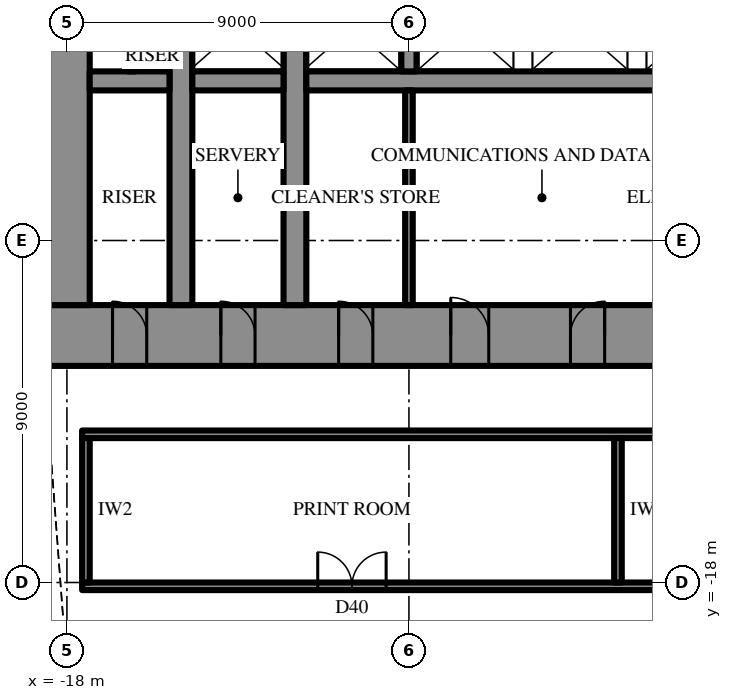
"""IFC4 building model, lengths in metres.
Left out: names, types, materials, properties, quantities, classifications, styles, units other than length and angle.
Written with IfcOpenShell. Run it as: python <this file> out.ifc"""

import sys

from ifc_helpers import new_model, si_unit, direction, frame, frame_2d, origin, place, context, subcontext, project, spatial, rectangle, extrude, element, fill, save


model = new_model("IFC4")
c1 = context("Model", 3, precision=1e-05, world=origin(), true_north=direction((0.0, 1.0)))
c2 = subcontext(c1, "Body", "Model", "MODEL_VIEW")
j1 = project(units=[si_unit("LENGTHUNIT", "METRE"), si_unit("PLANEANGLEUNIT", "RADIAN")], contexts=[c1])
p1 = place(None, origin())
s1 = spatial("IfcSite", under=j1, at=p1, CompositionType="ELEMENT")
p2 = place(p1, origin())
s2 = spatial("IfcBuilding", under=s1, at=p2, CompositionType="ELEMENT")
p3 = place(p2, frame((0.0, 0.0, 157.3)))
s3 = spatial("IfcBuildingStorey", under=s2, at=p3, CompositionType="ELEMENT", Elevation=157.3)
p4 = place(p3, frame((18.6, -11.5, 0.0), z_axis=(0.0, 0.0, 1.0), x_axis=(-1.0, 0.0, 0.0)))
e1 = element("IfcWall", 1, at=p4, inside=s3, PredefinedType="SHEAR", context=c2, shape_type="SweptSolid", body=[
    extrude(rectangle(XDim=37.2, YDim=1.6, at=frame_2d((18.6, 0.0))), origin(), (0.0, 0.0, 1.0), 4.2),
])
p5 = place(p4, frame((19.45, 0.0, 0.0)))
e2 = element("IfcOpeningElement", 2, at=p5, cuts=e1, PredefinedType="OPENING", context=c2, shape_type="SweptSolid", body=[
    extrude(rectangle(XDim=0.9, YDim=2.2, at=frame_2d((0.45, 1.1))), frame((0.0, 0.81, 0.0), z_axis=(0.0, -1.0, 0.0), x_axis=(1.0, 0.0, 0.0)), (0.0, 0.0, 1.0), 1.62),
])
p6 = place(p4, frame((22.45, 0.0, 0.0)))
e3 = element("IfcOpeningElement", 3, at=p6, cuts=e1, PredefinedType="OPENING", context=c2, shape_type="SweptSolid", body=[
    extrude(rectangle(XDim=0.9, YDim=2.2, at=frame_2d((0.45, 1.1))), frame((0.0, 0.81, 0.0), z_axis=(0.0, -1.0, 0.0), x_axis=(1.0, 0.0, 0.0)), (0.0, 0.0, 1.0), 1.62),
])
p7 = place(p4, frame((25.5, 0.0, 0.0)))
e4 = element("IfcOpeningElement", 4, at=p7, cuts=e1, PredefinedType="OPENING", context=c2, shape_type="SweptSolid", body=[
    extrude(rectangle(XDim=1.0, YDim=2.2, at=frame_2d((0.5, 1.1))), frame((0.0, 0.81, 0.0), z_axis=(0.0, -1.0, 0.0), x_axis=(1.0, 0.0, 0.0)), (0.0, 0.0, 1.0), 1.62),
])
p8 = place(p4, frame((1.8, 0.0, 0.0)))
e5 = element("IfcOpeningElement", 5, at=p8, cuts=e1, PredefinedType="OPENING", context=c2, shape_type="SweptSolid", body=[
    extrude(rectangle(XDim=0.9, YDim=2.2, at=frame_2d((0.45, 1.1))), frame((0.0, 0.81, 0.0), z_axis=(0.0, -1.0, 0.0), x_axis=(1.0, 0.0, 0.0)), (0.0, 0.0, 1.0), 1.62),
])
p9 = place(p4, frame((4.65, 0.0, 0.0)))
e6 = element("IfcOpeningElement", 6, at=p9, cuts=e1, PredefinedType="OPENING", context=c2, shape_type="SweptSolid", body=[
    extrude(rectangle(XDim=0.9, YDim=2.2, at=frame_2d((0.45, 1.1))), frame((0.0, 0.81, 0.0), z_axis=(0.0, -1.0, 0.0), x_axis=(1.0, 0.0, 0.0)), (0.0, 0.0, 1.0), 1.62),
])
p10 = place(p4, frame((7.75, 0.0, 0.0)))
e7 = element("IfcOpeningElement", 7, at=p10, cuts=e1, PredefinedType="OPENING", context=c2, shape_type="SweptSolid", body=[
    extrude(rectangle(XDim=0.9, YDim=2.2, at=frame_2d((0.45, 1.1))), frame((0.0, 0.81, 0.0), z_axis=(0.0, -1.0, 0.0), x_axis=(1.0, 0.0, 0.0)), (0.0, 0.0, 1.0), 1.62),
])
p11 = place(p4, frame((28.55, 0.0, 0.0)))
e8 = element("IfcOpeningElement", 8, at=p11, cuts=e1, PredefinedType="OPENING", context=c2, shape_type="SweptSolid", body=[
    extrude(rectangle(XDim=0.9, YDim=2.2, at=frame_2d((0.45, 1.1))), frame((0.0, 0.81, 0.0), z_axis=(0.0, -1.0, 0.0), x_axis=(1.0, 0.0, 0.0)), (0.0, 0.0, 1.0), 1.62),
])
p12 = place(p4, frame((31.65, 0.0, 0.0)))
e9 = element("IfcOpeningElement", 9, at=p12, cuts=e1, PredefinedType="OPENING", context=c2, shape_type="SweptSolid", body=[
    extrude(rectangle(XDim=0.9, YDim=2.2, at=frame_2d((0.45, 1.1))), frame((0.0, 0.81, 0.0), z_axis=(0.0, -1.0, 0.0), x_axis=(1.0, 0.0, 0.0)), (0.0, 0.0, 1.0), 1.62),
])
p13 = place(p4, frame((34.5, 0.0, 0.0)))
e10 = element("IfcOpeningElement", 10, at=p13, cuts=e1, PredefinedType="OPENING", context=c2, shape_type="SweptSolid", body=[
    extrude(rectangle(XDim=0.9, YDim=2.2, at=frame_2d((0.45, 1.1))), frame((0.0, 0.81, 0.0), z_axis=(0.0, -1.0, 0.0), x_axis=(1.0, 0.0, 0.0)), (0.0, 0.0, 1.0), 1.62),
])
p14 = place(p3, frame((-18.0, 10.7, 0.0), z_axis=(0.0, 0.0, 1.0), x_axis=(0.0, -1.0, 0.0)))
e11 = element("IfcWall", 11, at=p14, inside=s3, PredefinedType="SHEAR", context=c2, shape_type="SweptSolid", body=[
    extrude(rectangle(XDim=21.4, YDim=1.2, at=frame_2d((10.7, 0.0))), origin(), (0.0, 0.0, 1.0), 4.2),
])
p15 = place(p14, frame((9.8, 0.0, 0.0)))
e12 = element("IfcOpeningElement", 12, at=p15, cuts=e11, PredefinedType="OPENING", context=c2, shape_type="SweptSolid", body=[
    extrude(rectangle(XDim=1.8, YDim=2.4, at=frame_2d((0.9, 1.2))), frame((0.0, 0.61, 0.0), z_axis=(0.0, -1.0, 0.0), x_axis=(1.0, 0.0, 0.0)), (0.0, 0.0, 1.0), 1.22),
])
p16 = place(p3, frame((-12.0, -10.7, 0.0), z_axis=(0.0, 0.0, 1.0), x_axis=(0.0, 1.0, 0.0)))
e13 = element("IfcWall", 13, at=p16, inside=s3, PredefinedType="SHEAR", context=c2, shape_type="SweptSolid", body=[
    extrude(rectangle(XDim=21.4, YDim=0.6, at=frame_2d((10.7, 0.0))), origin(), (0.0, 0.0, 1.0), 4.2),
])
p17 = place(p16, frame((9.8, 0.0, 0.0)))
e14 = element("IfcOpeningElement", 14, at=p17, cuts=e13, PredefinedType="OPENING", context=c2, shape_type="SweptSolid", body=[
    extrude(rectangle(XDim=1.8, YDim=2.4, at=frame_2d((0.9, 1.2))), frame((0.0, 0.31, 0.0), z_axis=(0.0, -1.0, 0.0), x_axis=(1.0, 0.0, 0.0)), (0.0, 0.0, 1.0), 0.62),
])
p18 = place(p3, frame((-15.0, -10.7, 0.0), z_axis=(0.0, 0.0, 1.0), x_axis=(0.0, 1.0, 0.0)))
e15 = element("IfcWall", 15, at=p18, inside=s3, PredefinedType="SHEAR", context=c2, shape_type="SweptSolid", body=[
    extrude(rectangle(XDim=21.4, YDim=0.6, at=frame_2d((10.7, 0.0))), origin(), (0.0, 0.0, 1.0), 4.2),
])
p19 = place(p18, frame((9.8, 0.0, 0.0)))
e16 = element("IfcOpeningElement", 16, at=p19, cuts=e15, PredefinedType="OPENING", context=c2, shape_type="SweptSolid", body=[
    extrude(rectangle(XDim=1.8, YDim=2.4, at=frame_2d((0.9, 1.2))), frame((0.0, 0.31, 0.0), z_axis=(0.0, -1.0, 0.0), x_axis=(1.0, 0.0, 0.0)), (0.0, 0.0, 1.0), 0.62),
])
p20 = place(p3, frame((11.7, -4.8, 0.0), z_axis=(0.0, 0.0, 1.0), x_axis=(-1.0, 0.0, 0.0)))
e17 = element("IfcWall", 17, at=p20, inside=s3, PredefinedType="SHEAR", context=c2, shape_type="SweptSolid", body=[
    extrude(rectangle(XDim=23.4, YDim=0.5, at=frame_2d((11.7, 0.0))), origin(), (0.0, 0.0, 1.0), 4.2),
])
p21 = place(p20, frame((6.6, 0.0, 0.0)))
e18 = element("IfcOpeningElement", 18, at=p21, cuts=e17, PredefinedType="OPENING", context=c2, shape_type="SweptSolid", body=[
    extrude(rectangle(XDim=1.2, YDim=2.2, at=frame_2d((0.6, 1.1))), frame((0.0, 0.26, 0.0), z_axis=(0.0, -1.0, 0.0), x_axis=(1.0, 0.0, 0.0)), (0.0, 0.0, 1.0), 0.52),
])
p22 = place(p20, frame((3.6, 0.0, 0.0)))
e19 = element("IfcOpeningElement", 19, at=p22, cuts=e17, PredefinedType="OPENING", context=c2, shape_type="SweptSolid", body=[
    extrude(rectangle(XDim=1.2, YDim=2.2, at=frame_2d((0.6, 1.1))), frame((0.0, 0.26, 0.0), z_axis=(0.0, -1.0, 0.0), x_axis=(1.0, 0.0, 0.0)), (0.0, 0.0, 1.0), 0.52),
])
p23 = place(p3, frame((-12.3, -4.8, 0.0), z_axis=(0.0, 0.0, 1.0), x_axis=(-1.0, 0.0, 0.0)))
e20 = element("IfcWall", 20, at=p23, inside=s3, PredefinedType="SHEAR", context=c2, shape_type="SweptSolid", body=[
    extrude(rectangle(XDim=2.4, YDim=0.5, at=frame_2d((1.2, 0.0))), origin(), (0.0, 0.0, 1.0), 4.2),
])
p24 = place(p3, frame((-15.3, -4.8, 0.0), z_axis=(0.0, 0.0, 1.0), x_axis=(-1.0, 0.0, 0.0)))
e21 = element("IfcWall", 21, at=p24, inside=s3, PredefinedType="SHEAR", context=c2, shape_type="SweptSolid", body=[
    extrude(rectangle(XDim=2.1, YDim=0.5, at=frame_2d((1.05, 0.0))), origin(), (0.0, 0.0, 1.0), 4.2),
])
p25 = place(p3, frame((-9.0, -2.25, 0.0), z_axis=(0.0, 0.0, 1.0), x_axis=(0.0, -1.0, 0.0)))
e22 = element("IfcWall", 22, at=p25, inside=s3, PredefinedType="SHEAR", context=c2, shape_type="SweptSolid", body=[
    extrude(rectangle(XDim=2.3, YDim=0.4, at=frame_2d((1.15, 0.0))), origin(), (0.0, 0.0, 1.0), 4.2),
])
p26 = place(p3, frame((-9.0, -5.05, 0.0), z_axis=(0.0, 0.0, 1.0), x_axis=(0.0, -1.0, 0.0)))
e23 = element("IfcWall", 23, at=p26, inside=s3, PredefinedType="PARTITIONING", context=c2, shape_type="SweptSolid", body=[
    extrude(rectangle(XDim=5.65, YDim=0.2, at=frame_2d((2.825, 0.0))), origin(), (0.0, 0.0, 1.0), 4.0),
])
p27 = place(p3, frame((-16.3, -3.55, 0.0), z_axis=(0.0, 0.0, 1.0), x_axis=(0.0, -1.0, 0.0)))
e24 = element("IfcWall", 24, at=p27, inside=s3, PredefinedType="PARTITIONING", context=c2, shape_type="SweptSolid", body=[
    extrude(rectangle(XDim=1.0, YDim=0.2, at=frame_2d((0.5, 0.0))), origin(), (0.0, 0.0, 1.0), 4.0),
])
p28 = place(p3, frame((17.6, -14.1, 0.0), z_axis=(0.0, 0.0, 1.0), x_axis=(-1.0, 0.0, 0.0)))
e25 = element("IfcWall", 25, at=p28, inside=s3, PredefinedType="PARTITIONING", context=c2, shape_type="SweptSolid", body=[
    extrude(rectangle(XDim=35.2, YDim=0.2, at=frame_2d((17.6, 0.0))), origin(), (0.0, 0.0, 1.0), 4.0),
])
p29 = place(p3, frame((17.6, -18.1, 0.0), z_axis=(0.0, 0.0, 1.0), x_axis=(-1.0, 0.0, 0.0)))
e26 = element("IfcWall", 26, at=p29, inside=s3, PredefinedType="PARTITIONING", context=c2, shape_type="SweptSolid", body=[
    extrude(rectangle(XDim=35.2, YDim=0.2, at=frame_2d((17.6, 0.0))), origin(), (0.0, 0.0, 1.0), 4.0),
])
p30 = place(p29, frame((9.7, 0.0, 0.0)))
e27 = element("IfcOpeningElement", 27, at=p30, cuts=e26, PredefinedType="OPENING", context=c2, shape_type="SweptSolid", body=[
    extrude(rectangle(XDim=1.8, YDim=2.4, at=frame_2d((0.9, 1.2))), frame((0.0, 0.11, 0.0), z_axis=(0.0, -1.0, 0.0), x_axis=(1.0, 0.0, 0.0)), (0.0, 0.0, 1.0), 0.22),
])
p31 = place(p29, frame((27.2, 0.0, 0.0)))
e28 = element("IfcOpeningElement", 28, at=p31, cuts=e26, PredefinedType="OPENING", context=c2, shape_type="SweptSolid", body=[
    extrude(rectangle(XDim=1.8, YDim=2.4, at=frame_2d((0.9, 1.2))), frame((0.0, 0.11, 0.0), z_axis=(0.0, -1.0, 0.0), x_axis=(1.0, 0.0, 0.0)), (0.0, 0.0, 1.0), 0.22),
])
for number, where, z_axis, x_axis in (
    (29, (-3.5, -14.2, 0.0), (0.0, 0.0, 1.0), (0.0, -1.0, 0.0)),
    (30, (-17.5, -14.2, 0.0), (0.0, 0.0, 1.0), (0.0, -1.0, 0.0)),
):
    element("IfcWall", number, at=place(p3, frame(where, z_axis=z_axis, x_axis=x_axis)), inside=s3, PredefinedType="PARTITIONING", context=c2, shape_type="SweptSolid", body=[
        extrude(rectangle(XDim=3.8, YDim=0.2, at=frame_2d((1.9, 0.0))), origin(), (0.0, 0.0, 1.0), 4.0),
    ])
p32 = place(p6, frame((0.9, 0.0, 0.0), z_axis=(0.0, 0.0, 1.0), x_axis=(-1.0, 0.0, 0.0)))
e31 = element("IfcDoor", 31, at=p32, inside=s3, OperationType="SINGLE_SWING_LEFT", PredefinedType="DOOR", context=c2, shape_type="SweptSolid", body=[
    extrude(rectangle(XDim=0.9, YDim=2.2, at=frame_2d((0.45, 1.1))), frame((0.0, 0.025, 0.0), z_axis=(0.0, -1.0, 0.0), x_axis=(1.0, 0.0, 0.0)), (0.0, 0.0, 1.0), 0.05),
])
fill(e3, e31)
p33 = place(p7, frame((1.0, 0.0, 0.0), z_axis=(0.0, 0.0, 1.0), x_axis=(-1.0, 0.0, 0.0)))
e32 = element("IfcDoor", 32, at=p33, inside=s3, OperationType="SINGLE_SWING_RIGHT", PredefinedType="DOOR", context=c2, shape_type="SweptSolid", body=[
    extrude(rectangle(XDim=1.0, YDim=2.2, at=frame_2d((0.5, 1.1))), frame((0.0, 0.025, 0.0), z_axis=(0.0, -1.0, 0.0), x_axis=(1.0, 0.0, 0.0)), (0.0, 0.0, 1.0), 0.05),
])
fill(e4, e32)
p34 = place(p11, frame((0.9, 0.0, 0.0), z_axis=(0.0, 0.0, 1.0), x_axis=(-1.0, 0.0, 0.0)))
e33 = element("IfcDoor", 33, at=p34, inside=s3, OperationType="SINGLE_SWING_RIGHT", PredefinedType="DOOR", context=c2, shape_type="SweptSolid", body=[
    extrude(rectangle(XDim=0.9, YDim=2.2, at=frame_2d((0.45, 1.1))), frame((0.0, 0.025, 0.0), z_axis=(0.0, -1.0, 0.0), x_axis=(1.0, 0.0, 0.0)), (0.0, 0.0, 1.0), 0.05),
])
fill(e8, e33)
p35 = place(p12, frame((0.9, 0.0, 0.0), z_axis=(0.0, 0.0, 1.0), x_axis=(-1.0, 0.0, 0.0)))
e34 = element("IfcDoor", 34, at=p35, inside=s3, OperationType="SINGLE_SWING_RIGHT", PredefinedType="DOOR", context=c2, shape_type="SweptSolid", body=[
    extrude(rectangle(XDim=0.9, YDim=2.2, at=frame_2d((0.45, 1.1))), frame((0.0, 0.025, 0.0), z_axis=(0.0, -1.0, 0.0), x_axis=(1.0, 0.0, 0.0)), (0.0, 0.0, 1.0), 0.05),
])
fill(e9, e34)
p36 = place(p13, frame((0.9, 0.0, 0.0), z_axis=(0.0, 0.0, 1.0), x_axis=(-1.0, 0.0, 0.0)))
e35 = element("IfcDoor", 35, at=p36, inside=s3, OperationType="SINGLE_SWING_RIGHT", PredefinedType="DOOR", context=c2, shape_type="SweptSolid", body=[
    extrude(rectangle(XDim=0.9, YDim=2.2, at=frame_2d((0.45, 1.1))), frame((0.0, 0.025, 0.0), z_axis=(0.0, -1.0, 0.0), x_axis=(1.0, 0.0, 0.0)), (0.0, 0.0, 1.0), 0.05),
])
fill(e10, e35)
p37 = place(p31, frame((1.8, 0.0, 0.0), z_axis=(0.0, 0.0, 1.0), x_axis=(-1.0, 0.0, 0.0)))
e36 = element("IfcDoor", 36, at=p37, inside=s3, OperationType="DOUBLE_DOOR_SINGLE_SWING", PredefinedType="DOOR", context=c2, shape_type="SweptSolid", body=[
    extrude(rectangle(XDim=1.8, YDim=2.4, at=frame_2d((0.9, 1.2))), frame((0.0, 0.025, 0.0), z_axis=(0.0, -1.0, 0.0), x_axis=(1.0, 0.0, 0.0)), (0.0, 0.0, 1.0), 0.05),
])
fill(e28, e36)
save(model, sys.argv[1])
